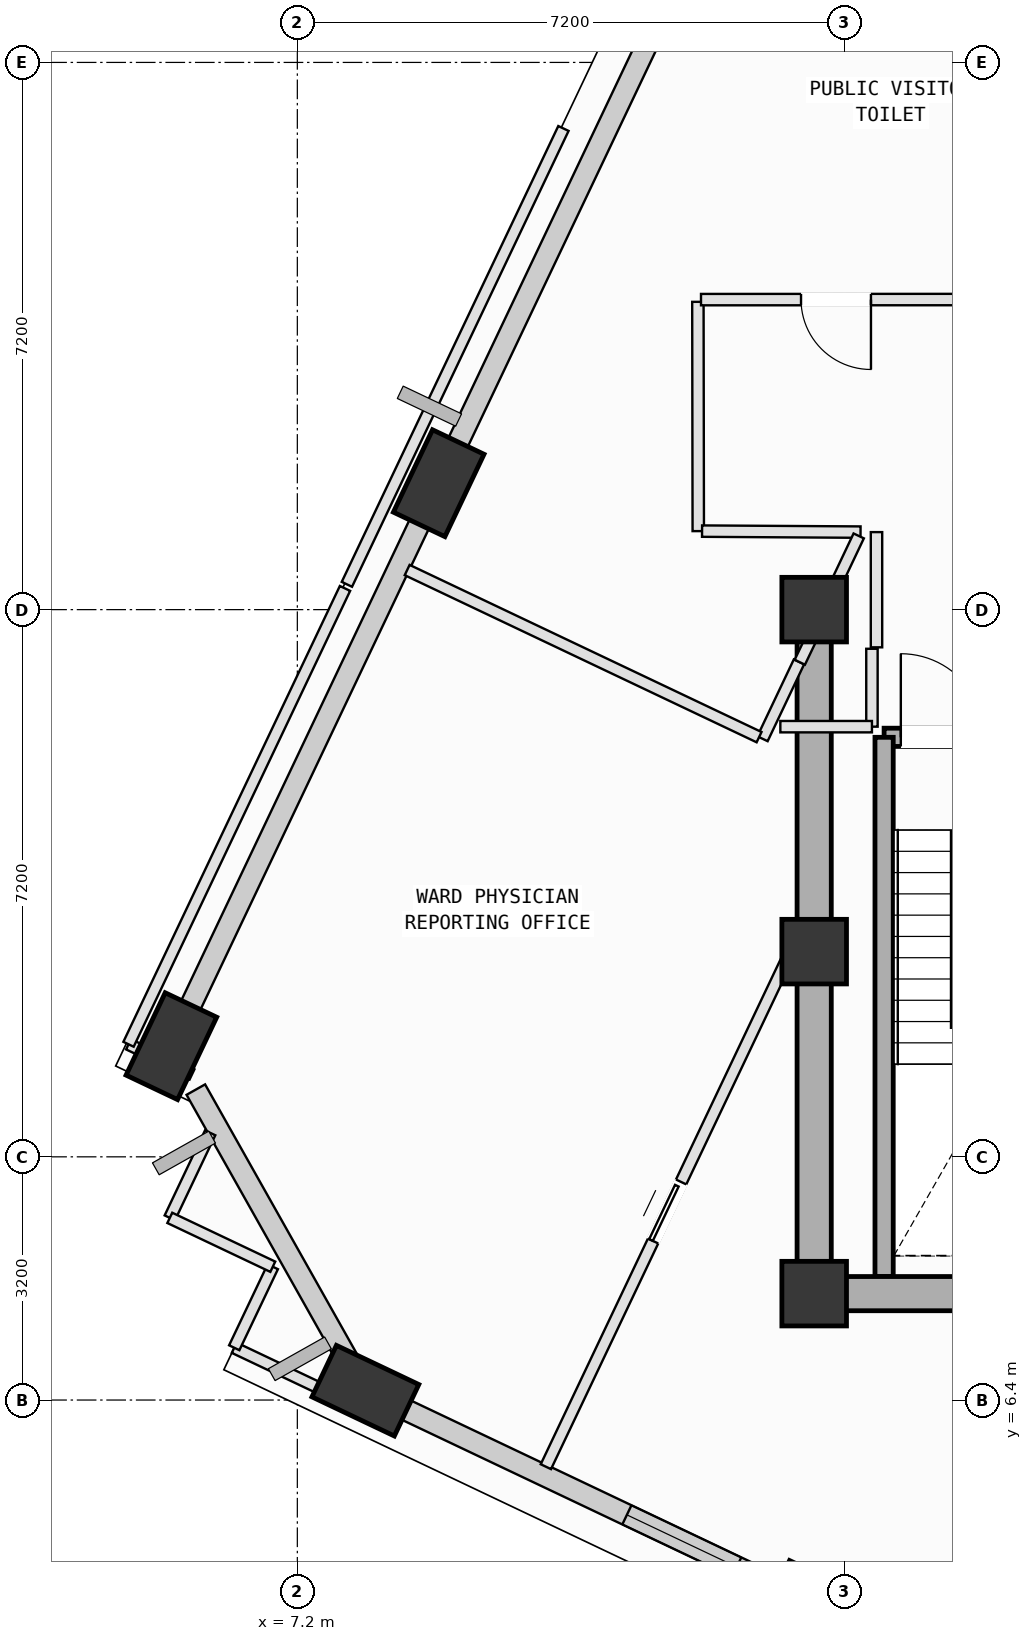
"""IFC4 building model, lengths in metres.
Left out: names, types, materials, properties, quantities, classifications, styles, units other than length and angle.
Written with IfcOpenShell. Run it as: python <this file> out.ifc"""

import sys

from ifc_helpers import new_model, si_unit, direction, frame, frame_2d, origin, origin_2d, place, context, subcontext, project, spatial, rectangle, extrude, element, fill, save


model = new_model("IFC4")
c1 = context("Model", 3, precision=1e-05, world=origin(), true_north=direction((0.0, 1.0)))
c2 = subcontext(c1, "Body", "Model", "MODEL_VIEW")
j1 = project(units=[si_unit("LENGTHUNIT", "METRE"), si_unit("PLANEANGLEUNIT", "RADIAN")], contexts=[c1])
p1 = place(None, origin())
s1 = spatial("IfcSite", under=j1, at=p1, CompositionType="ELEMENT")
p2 = place(p1, origin())
s2 = spatial("IfcBuilding", under=s1, at=p2, CompositionType="ELEMENT")
p3 = place(p2, frame((0.0, 0.0, 300.6)))
s3 = spatial("IfcBuildingStorey", under=s2, at=p3, CompositionType="ELEMENT", Elevation=300.6)
for number, where, z_axis, x_axis in (
    (1, (14.0, 7.8, 0.0), (0.0, 0.0, 1.0), (1.0, 0.0, 0.0)),
    (2, (14.0, 12.3, 0.0), (0.0, 0.0, 1.0), (1.0, 0.0, 0.0)),
    (3, (14.0, 16.8, 0.0), (0.0, 0.0, 1.0), (1.0, 0.0, 0.0)),
):
    element("IfcColumn", number, at=place(p3, frame(where, z_axis=z_axis, x_axis=x_axis)), inside=s3, PredefinedType="COLUMN", context=c2, shape_type="SweptSolid", body=[
        extrude(rectangle(XDim=0.85, YDim=0.85, at=origin_2d()), origin(), (0.0, 0.0, 1.0), 4.0),
    ])
p4 = place(p3, frame((9.06, 18.463, 0.002), z_axis=(0.026915333163, -0.100917310121, 0.994530673915), x_axis=(0.182932695043, 0.978587726535, 0.094348770839)))
e4 = element("IfcColumn", 4, at=p4, inside=s3, PredefinedType="COLUMN", context=c2, shape_type="SweptSolid", body=[
    extrude(rectangle(XDim=1.2, YDim=0.75, at=origin_2d()), origin(), (0.0, 0.0, 1.0), 4.018),
])
p5 = place(p3, frame((5.543, 11.056, 0.002), z_axis=(0.057434751966, -0.114869503932, 0.991718834314), x_axis=(-0.016987120789, 0.993102357806, 0.116013553724)))
e5 = element("IfcColumn", 5, at=p5, inside=s3, PredefinedType="COLUMN", context=c2, shape_type="SweptSolid", body=[
    extrude(rectangle(XDim=1.2, YDim=0.75, at=origin_2d()), origin(), (0.0, 0.0, 1.0), 4.03),
])
p6 = place(p3, frame((8.095, 6.523, 0.002), z_axis=(0.07596860376, -0.104199360819, 0.991650777465), x_axis=(-0.980520295102, -0.188468849374, 0.055312238325)))
e6 = element("IfcColumn", 6, at=p6, inside=s3, PredefinedType="COLUMN", context=c2, shape_type="SweptSolid", body=[
    extrude(rectangle(XDim=1.2, YDim=0.75, at=origin_2d()), origin(), (0.0, 0.0, 1.0), 4.03),
])
p7 = place(p3, frame((9.152, 18.656, 0.0), z_axis=(0.0, 0.0, 1.0), x_axis=(0.428927525455, 0.903338905343, 0.0)))
e7 = element("IfcWall", 7, at=p7, inside=s3, PredefinedType="SOLIDWALL", context=c2, shape_type="SweptSolid", body=[
    extrude(rectangle(XDim=7.434, YDim=0.28, at=frame_2d((3.717, 0.0))), origin(), (0.0, 0.0, 1.0), 3.265),
])
p8 = place(p3, frame((5.621, 11.22, 0.0), z_axis=(0.0, 0.0, 1.0), x_axis=(0.428933056581, 0.903336279008, 0.0)))
e8 = element("IfcWall", 8, at=p8, inside=s3, PredefinedType="SOLIDWALL", context=c2, shape_type="SweptSolid", body=[
    extrude(rectangle(XDim=7.485, YDim=0.28, at=frame_2d((3.742, 0.0))), origin(), (0.0, 0.0, 1.0), 3.265),
])
p9 = place(p3, frame((8.027, 6.644, 0.0), z_axis=(0.0, 0.0, 1.0), x_axis=(-0.490647729697, 0.871358023629, 0.0)))
e9 = element("IfcWall", 9, at=p9, inside=s3, PredefinedType="SOLIDWALL", context=c2, shape_type="SweptSolid", body=[
    extrude(rectangle(XDim=4.408, YDim=0.28, at=frame_2d((2.204, 0.0))), origin(), (0.0, 0.0, 1.0), 3.265),
])
p10 = place(p3, frame((13.909, 3.762, 0.0), z_axis=(0.0, 0.0, 1.0), x_axis=(-0.903329022503, 0.428948338503, 0.0)))
e10 = element("IfcWall", 10, at=p10, inside=s3, PredefinedType="SOLIDWALL", context=c2, shape_type="SweptSolid", body=[
    extrude(rectangle(XDim=5.831, YDim=0.28, at=frame_2d((2.915, 0.0))), origin(), (0.0, 0.0, 1.0), 3.265),
])
p11 = place(p10, frame((1.028, 0.0, 0.75)))
e11 = element("IfcOpeningElement", 11, at=p11, cuts=e10, PredefinedType="OPENING", context=c2, shape_type="SweptSolid", body=[
    extrude(rectangle(XDim=1.6, YDim=1.95, at=frame_2d((0.8, 0.975))), frame((0.0, 0.15, 0.0), z_axis=(0.0, -1.0, 0.0), x_axis=(1.0, 0.0, 0.0)), (0.0, 0.0, 1.0), 0.3),
])
p12 = place(p3, frame((14.92, 15.12, 0.0), z_axis=(0.0, 0.0, 1.0), x_axis=(1.0, 0.0, 0.0)))
e12 = element("IfcWall", 12, at=p12, inside=s3, PredefinedType="SOLIDWALL", context=c2, shape_type="SweptSolid", body=[
    extrude(rectangle(XDim=3.46, YDim=0.24, at=frame_2d((1.73, 0.0))), origin(), (0.0, 0.0, 1.0), 3.78),
])
p13 = place(p12, frame((0.22, 0.0, 0.0)))
e13 = element("IfcOpeningElement", 13, at=p13, cuts=e12, PredefinedType="OPENING", context=c2, shape_type="SweptSolid", body=[
    extrude(rectangle(XDim=1.1, YDim=2.15, at=frame_2d((0.55, 1.075))), frame((0.0, 0.13, 0.0), z_axis=(0.0, -1.0, 0.0), x_axis=(1.0, 0.0, 0.0)), (0.0, 0.0, 1.0), 0.26),
])
p14 = place(p3, frame((14.92, 8.025, 0.0), z_axis=(0.0, 0.0, 1.0), x_axis=(0.0, 1.0, 0.0)))
e14 = element("IfcWall", 14, at=p14, inside=s3, PredefinedType="SOLIDWALL", context=c2, shape_type="SweptSolid", body=[
    extrude(rectangle(XDim=7.095, YDim=0.24, at=frame_2d((3.548, 0.0))), origin(), (0.0, 0.0, 1.0), 3.78),
])
p15 = place(p3, frame((14.0, 7.8, 0.0), z_axis=(0.0, 0.0, 1.0), x_axis=(1.0, 0.0, 0.0)))
e15 = element("IfcWall", 15, at=p15, inside=s3, PredefinedType="SHEAR", context=c2, shape_type="SweptSolid", body=[
    extrude(rectangle(XDim=10.8, YDim=0.45, at=frame_2d((5.4, 0.0))), origin(), (0.0, 0.0, 1.0), 3.78),
])
p16 = place(p3, frame((14.0, 16.8, 0.0), z_axis=(0.0, 0.0, 1.0), x_axis=(0.0, -1.0, 0.0)))
e16 = element("IfcWall", 16, at=p16, inside=s3, PredefinedType="SHEAR", context=c2, shape_type="SweptSolid", body=[
    extrude(rectangle(XDim=9.0, YDim=0.45, at=frame_2d((4.5, 0.0))), origin(), (0.0, 0.0, 1.0), 3.78),
])
p17 = place(p3, frame((10.47, 5.523, 0.0), z_axis=(0.0, 0.0, 1.0), x_axis=(0.42903605121, 0.903287366657, 0.0)))
e17 = element("IfcWall", 17, at=p17, inside=s3, PredefinedType="PARTITIONING", context=c2, shape_type="SweptSolid", body=[
    extrude(rectangle(XDim=7.435, YDim=0.15, at=frame_2d((3.718, 0.0))), origin(), (0.0, 0.0, 1.0), 3.78),
])
p18 = place(p17, frame((3.288, 0.0, 0.0)))
e18 = element("IfcOpeningElement", 18, at=p18, cuts=e17, PredefinedType="OPENING", context=c2, shape_type="SweptSolid", body=[
    extrude(rectangle(XDim=0.86, YDim=2.06, at=frame_2d((0.43, 1.03))), frame((0.0, 0.085, 0.0), z_axis=(0.0, -1.0, 0.0), x_axis=(1.0, 0.0, 0.0)), (0.0, 0.0, 1.0), 0.17),
])
p19 = place(p3, frame((5.522, 8.797, 0.0), z_axis=(0.0, 0.0, 1.0), x_axis=(0.428747179251, 0.903424516096, 0.0)))
e19 = element("IfcWall", 19, at=p19, inside=s3, PredefinedType="PARTITIONING", context=c2, shape_type="SweptSolid", body=[
    extrude(rectangle(XDim=1.239, YDim=0.15, at=frame_2d((0.619, 0.0))), origin(), (0.0, 0.0, 1.0), 3.78),
])
p20 = place(p3, frame((8.544, 6.056, 0.0), z_axis=(0.0, 0.0, 1.0), x_axis=(-0.903371851352, 0.428858132936, 0.0)))
e20 = element("IfcWall", 20, at=p20, inside=s3, PredefinedType="PARTITIONING", context=c2, shape_type="SweptSolid", body=[
    extrude(rectangle(XDim=2.406, YDim=0.15, at=frame_2d((1.203, 0.0))), origin(), (0.0, 0.0, 1.0), 3.265),
])
p21 = place(p3, frame((6.37, 7.088, 0.0), z_axis=(0.0, 0.0, 1.0), x_axis=(0.429339431614, 0.903143207061, 0.0)))
e21 = element("IfcWall", 21, at=p21, inside=s3, PredefinedType="PARTITIONING", context=c2, shape_type="SweptSolid", body=[
    extrude(rectangle(XDim=1.18, YDim=0.15, at=frame_2d((0.59, 0.0))), origin(), (0.0, 0.0, 1.0), 3.78),
])
p22 = place(p3, frame((6.877, 8.154, 0.0), z_axis=(0.0, 0.0, 1.0), x_axis=(-0.90341939824, 0.428757963056, 0.0)))
e22 = element("IfcWall", 22, at=p22, inside=s3, PredefinedType="PARTITIONING", context=c2, shape_type="SweptSolid", body=[
    extrude(rectangle(XDim=1.5, YDim=0.15, at=frame_2d((0.75, 0.0))), origin(), (0.0, 0.0, 1.0), 3.78),
])
p23 = place(p3, frame((12.47, 20.85, 0.0), z_axis=(0.0, 0.0, 1.0), x_axis=(0.001699301641, -0.999998556186, 0.0)))
e23 = element("IfcWall", 23, at=p23, inside=s3, PredefinedType="PARTITIONING", context=c2, shape_type="SweptSolid", body=[
    extrude(rectangle(XDim=3.017, YDim=0.15, at=frame_2d((1.509, 0.0))), origin(), (0.0, 0.0, 1.0), 3.415),
])
p24 = place(p3, frame((12.525, 17.833, 0.0), z_axis=(0.0, 0.0, 1.0), x_axis=(0.999980747295, -0.0062052429, 0.0)))
e24 = element("IfcWall", 24, at=p24, inside=s3, PredefinedType="PARTITIONING", context=c2, shape_type="SweptSolid", body=[
    extrude(rectangle(XDim=2.085, YDim=0.15, at=frame_2d((1.042, 0.0))), origin(), (0.0, 0.0, 1.0), 3.78),
])
p25 = place(p3, frame((14.586, 17.77, 0.0), z_axis=(0.0, 0.0, 1.0), x_axis=(-0.428271414161, -0.903650151227, 0.0)))
e25 = element("IfcWall", 25, at=p25, inside=s3, PredefinedType="PARTITIONING", context=c2, shape_type="SweptSolid", body=[
    extrude(rectangle(XDim=0.964, YDim=0.15, at=frame_2d((0.482, 0.0))), origin(), (0.0, 0.0, 1.0), 3.78),
])
p26 = place(p3, frame((13.8, 16.113, 0.0), z_axis=(0.0, 0.0, 1.0), x_axis=(-0.428545424875, -0.903520237083, 0.0)))
e26 = element("IfcWall", 26, at=p26, inside=s3, PredefinedType="PARTITIONING", context=c2, shape_type="SweptSolid", body=[
    extrude(rectangle(XDim=1.12, YDim=0.15, at=frame_2d((0.56, 0.0))), origin(), (0.0, 0.0, 1.0), 3.78),
])
p27 = place(p3, frame((13.275, 15.122, 0.0), z_axis=(0.0, 0.0, 1.0), x_axis=(-0.903294117812, 0.42902183712, 0.0)))
e27 = element("IfcWall", 27, at=p27, inside=s3, PredefinedType="PARTITIONING", context=c2, shape_type="SweptSolid", body=[
    extrude(rectangle(XDim=5.125, YDim=0.15, at=frame_2d((2.563, 0.0))), origin(), (0.0, 0.0, 1.0), 3.78),
])
p28 = place(p3, frame((8.659, 18.063, 0.0), z_axis=(0.0, 0.0, 1.0), x_axis=(0.42948980012, 0.903071708998, 0.0)))
e28 = element("IfcWall", 28, at=p28, inside=s3, PredefinedType="PARTITIONING", context=c2, shape_type="SweptSolid", body=[
    extrude(rectangle(XDim=0.748, YDim=0.15, at=frame_2d((0.374, 0.0))), origin(), (0.0, 0.0, 1.0), 3.78),
])
p29 = place(p3, frame((16.063, 20.88, 0.0), z_axis=(0.0, 0.0, 1.0), x_axis=(-0.999999962206, -0.000274932975, 0.0)))
e29 = element("IfcWall", 29, at=p29, inside=s3, PredefinedType="PARTITIONING", context=c2, shape_type="SweptSolid", body=[
    extrude(rectangle(XDim=3.552, YDim=0.15, at=frame_2d((1.776, 0.0))), origin(), (0.0, 0.0, 1.0), 3.415),
])
p30 = place(p29, frame((1.316, 0.0, 0.0)))
e30 = element("IfcOpeningElement", 30, at=p30, cuts=e29, PredefinedType="OPENING", context=c2, shape_type="SweptSolid", body=[
    extrude(rectangle(XDim=0.92, YDim=2.1, at=frame_2d((0.46, 1.05))), frame((0.0, 0.085, 0.0), z_axis=(0.0, -1.0, 0.0), x_axis=(1.0, 0.0, 0.0)), (0.0, 0.0, 1.0), 0.17),
])
p31 = place(p3, frame((5.814, 10.684, 0.0), z_axis=(0.0, 0.0, 1.0), x_axis=(-0.903123932355, 0.429379974856, 0.0)))
e31 = element("IfcWall", 31, at=p31, inside=s3, PredefinedType="PARTITIONING", context=c2, shape_type="SweptSolid", body=[
    extrude(rectangle(XDim=0.925, YDim=0.15, at=frame_2d((0.462, 0.0))), origin(), (0.0, 0.0, 1.0), 3.78),
])
p32 = place(p3, frame((4.979, 11.081, 0.0), z_axis=(0.0, 0.0, 1.0), x_axis=(0.428912807324, 0.903345893727, 0.0)))
e32 = element("IfcWall", 32, at=p32, inside=s3, PredefinedType="PARTITIONING", context=c2, shape_type="SweptSolid", body=[
    extrude(rectangle(XDim=6.64, YDim=0.15, at=frame_2d((3.32, 0.0))), origin(), (0.0, 0.0, 1.0), 3.78),
])
p33 = place(p3, frame((14.76, 16.285, 0.0), z_axis=(0.0, 0.0, 1.0), x_axis=(0.0, -1.0, 0.0)))
e33 = element("IfcWall", 33, at=p33, inside=s3, PredefinedType="PARTITIONING", context=c2, shape_type="SweptSolid", body=[
    extrude(rectangle(XDim=1.025, YDim=0.15, at=frame_2d((0.512, 0.0))), origin(), (0.0, 0.0, 1.0), 3.78),
])
p34 = place(p3, frame((14.76, 15.26, 0.0), z_axis=(0.0, 0.0, 1.0), x_axis=(-1.0, 0.0, 0.0)))
e34 = element("IfcWall", 34, at=p34, inside=s3, PredefinedType="PARTITIONING", context=c2, shape_type="SweptSolid", body=[
    extrude(rectangle(XDim=1.205, YDim=0.15, at=frame_2d((0.603, 0.0))), origin(), (0.0, 0.0, 1.0), 3.78),
])
p35 = place(p3, frame((7.852, 17.133, 0.0), z_axis=(0.0, 0.0, 1.0), x_axis=(0.429032815632, 0.903288903458, 0.0)))
e35 = element("IfcWall", 35, at=p35, inside=s3, PredefinedType="PARTITIONING", context=c2, shape_type="SweptSolid", body=[
    extrude(rectangle(XDim=6.64, YDim=0.15, at=frame_2d((3.32, 0.0))), origin(), (0.0, 0.0, 1.0), 3.78),
])
p36 = place(p3, frame((13.811, 16.108, 0.0), z_axis=(0.0, 0.0, 1.0), x_axis=(0.431892084919, 0.901925289026, 0.0)))
e36 = element("IfcWall", 36, at=p36, inside=s3, PredefinedType="PARTITIONING", context=c2, shape_type="SweptSolid", body=[
    extrude(rectangle(XDim=0.871, YDim=0.15, at=frame_2d((0.435, 0.0))), origin(), (0.0, 0.0, 1.0), 3.78),
])
p37 = place(p3, frame((14.82, 17.82, 0.0), z_axis=(0.0, 0.0, 1.0), x_axis=(0.0, -1.0, 0.0)))
e37 = element("IfcWall", 37, at=p37, inside=s3, PredefinedType="PARTITIONING", context=c2, shape_type="SweptSolid", body=[
    extrude(rectangle(XDim=1.516, YDim=0.15, at=frame_2d((0.758, 0.0))), origin(), (0.0, 0.0, 1.0), 3.78),
])
p38 = place(p11, origin())
e38 = element("IfcWindow", 38, at=p38, inside=s3, PartitioningType="SINGLE_PANEL", PredefinedType="WINDOW", context=c2, shape_type="SweptSolid", body=[
    extrude(rectangle(XDim=1.6, YDim=1.95, at=frame_2d((0.8, 0.975))), frame((0.0, 0.03, 0.0), z_axis=(0.0, -1.0, 0.0), x_axis=(1.0, 0.0, 0.0)), (0.0, 0.0, 1.0), 0.06),
])
fill(e11, e38)
p39 = place(p13, origin())
e39 = element("IfcDoor", 39, at=p39, inside=s3, OperationType="SINGLE_SWING_LEFT", PredefinedType="DOOR", context=c2, shape_type="SweptSolid", body=[
    extrude(rectangle(XDim=1.1, YDim=2.15, at=frame_2d((0.55, 1.075))), frame((0.0, 0.025, 0.0), z_axis=(0.0, -1.0, 0.0), x_axis=(1.0, 0.0, 0.0)), (0.0, 0.0, 1.0), 0.05),
])
fill(e13, e39)
p40 = place(p30, origin())
e40 = element("IfcDoor", 40, at=p40, inside=s3, OperationType="SINGLE_SWING_LEFT", PredefinedType="DOOR", context=c2, shape_type="SweptSolid", body=[
    extrude(rectangle(XDim=0.92, YDim=2.1, at=frame_2d((0.46, 1.05))), frame((0.0, 0.025, 0.0), z_axis=(0.0, -1.0, 0.0), x_axis=(1.0, 0.0, 0.0)), (0.0, 0.0, 1.0), 0.05),
])
fill(e30, e40)
p41 = place(p18, origin())
e41 = element("IfcDoor", 41, at=p41, inside=s3, OperationType="SLIDING_TO_LEFT", PredefinedType="DOOR", context=c2, shape_type="SweptSolid", body=[
    extrude(rectangle(XDim=0.86, YDim=2.06, at=frame_2d((0.43, 1.03))), frame((0.0, 0.025, 0.0), z_axis=(0.0, -1.0, 0.0), x_axis=(1.0, 0.0, 0.0)), (0.0, 0.0, 1.0), 0.05),
])
fill(e18, e41)
save(model, sys.argv[1])
